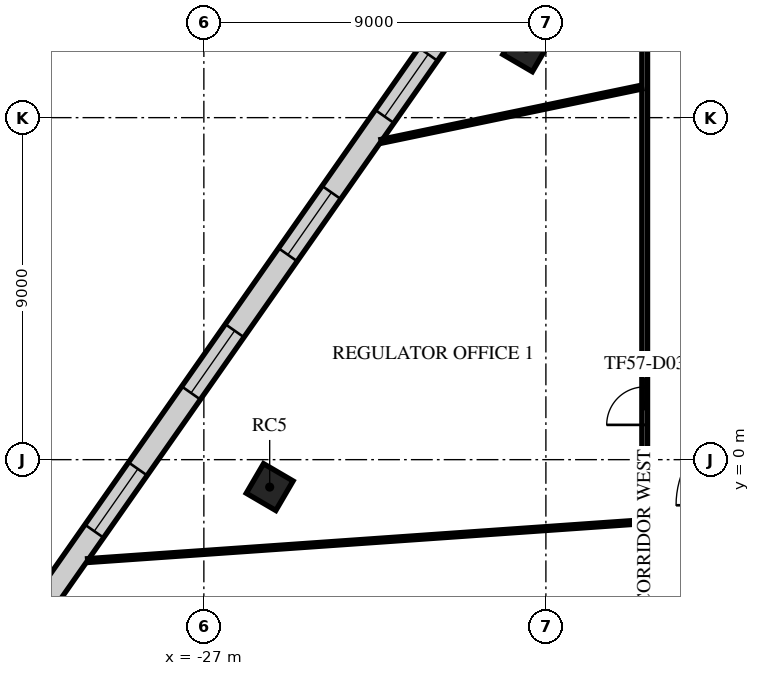
"""IFC4 building model, lengths in metres.
Left out: names, types, materials, properties, quantities, classifications, styles, units other than length and angle.
Written with IfcOpenShell. Run it as: python <this file> out.ifc"""

import sys

from ifc_helpers import new_model, si_unit, direction, frame, frame_2d, origin, origin_2d, place, context, subcontext, project, spatial, rectangle, extrude, element, fill, save


model = new_model("IFC4")
c1 = context("Model", 3, precision=1e-05, world=origin(), true_north=direction((0.0, 1.0)))
c2 = subcontext(c1, "Body", "Model", "MODEL_VIEW")
j1 = project(units=[si_unit("LENGTHUNIT", "METRE"), si_unit("PLANEANGLEUNIT", "RADIAN")], contexts=[c1])
p1 = place(None, origin())
s1 = spatial("IfcSite", under=j1, at=p1, CompositionType="ELEMENT")
p2 = place(p1, origin())
s2 = spatial("IfcBuilding", under=s1, at=p2, CompositionType="ELEMENT")
p3 = place(p2, frame((0.0, 0.0, 242.9)))
s3 = spatial("IfcBuildingStorey", under=s2, at=p3, CompositionType="ELEMENT", Elevation=242.9)
for number, where, z_axis, x_axis in (
    (1, (-18.518, 10.825, -0.36), (0.0, 0.0, 1.0), (0.505, 0.863, 0.0)),
    (2, (-25.268, -0.722, -0.36), (0.0, 0.0, 1.0), (0.505, 0.863, 0.0)),
):
    element("IfcColumn", number, at=place(p3, frame(where, z_axis=z_axis, x_axis=x_axis)), inside=s3, PredefinedType="COLUMN", context=c2, shape_type="SweptSolid", body=[
        extrude(rectangle(XDim=0.9, YDim=0.9, at=origin_2d()), origin(), (0.0, 0.0, 1.0), 4.36),
    ])
p4 = place(p3, frame((-5.115, 33.491, 0.0), z_axis=(0.0, 0.0, 1.0), x_axis=(-0.57357740375, -0.819151366908, 0.0)))
e3 = element("IfcWall", 3, at=p4, inside=s3, PredefinedType="STANDARD", context=c2, shape_type="SweptSolid", body=[
    extrude(rectangle(XDim=48.843, YDim=0.6, at=frame_2d((24.422, 0.0))), origin(), (0.0, 0.0, 1.0), 3.64),
])
p5 = place(p4, frame((1.22, 0.0, 0.9)))
e4 = element("IfcOpeningElement", 4, at=p5, cuts=e3, PredefinedType="OPENING", context=c2, shape_type="SweptSolid", body=[
    extrude(rectangle(XDim=2.0, YDim=2.1, at=frame_2d((1.0, 1.05))), frame((0.0, 0.31, 0.0), z_axis=(0.0, -1.0, 0.0), x_axis=(1.0, 0.0, 0.0)), (0.0, 0.0, 1.0), 0.62),
])
p6 = place(p4, frame((5.66, 0.0, 0.9)))
e5 = element("IfcOpeningElement", 5, at=p6, cuts=e3, PredefinedType="OPENING", context=c2, shape_type="SweptSolid", body=[
    extrude(rectangle(XDim=2.0, YDim=2.1, at=frame_2d((1.0, 1.05))), frame((0.0, 0.31, 0.0), z_axis=(0.0, -1.0, 0.0), x_axis=(1.0, 0.0, 0.0)), (0.0, 0.0, 1.0), 0.62),
])
p7 = place(p4, frame((10.101, 0.0, 0.9)))
e6 = element("IfcOpeningElement", 6, at=p7, cuts=e3, PredefinedType="OPENING", context=c2, shape_type="SweptSolid", body=[
    extrude(rectangle(XDim=2.0, YDim=2.1, at=frame_2d((1.0, 1.05))), frame((0.0, 0.31, 0.0), z_axis=(0.0, -1.0, 0.0), x_axis=(1.0, 0.0, 0.0)), (0.0, 0.0, 1.0), 0.62),
])
p8 = place(p4, frame((14.541, 0.0, 0.9)))
e7 = element("IfcOpeningElement", 7, at=p8, cuts=e3, PredefinedType="OPENING", context=c2, shape_type="SweptSolid", body=[
    extrude(rectangle(XDim=2.0, YDim=2.1, at=frame_2d((1.0, 1.05))), frame((0.0, 0.31, 0.0), z_axis=(0.0, -1.0, 0.0), x_axis=(1.0, 0.0, 0.0)), (0.0, 0.0, 1.0), 0.62),
])
p9 = place(p4, frame((18.981, 0.0, 0.9)))
e8 = element("IfcOpeningElement", 8, at=p9, cuts=e3, PredefinedType="OPENING", context=c2, shape_type="SweptSolid", body=[
    extrude(rectangle(XDim=2.0, YDim=2.1, at=frame_2d((1.0, 1.05))), frame((0.0, 0.31, 0.0), z_axis=(0.0, -1.0, 0.0), x_axis=(1.0, 0.0, 0.0)), (0.0, 0.0, 1.0), 0.62),
])
p10 = place(p4, frame((23.422, 0.0, 0.9)))
e9 = element("IfcOpeningElement", 9, at=p10, cuts=e3, PredefinedType="OPENING", context=c2, shape_type="SweptSolid", body=[
    extrude(rectangle(XDim=2.0, YDim=2.1, at=frame_2d((1.0, 1.05))), frame((0.0, 0.31, 0.0), z_axis=(0.0, -1.0, 0.0), x_axis=(1.0, 0.0, 0.0)), (0.0, 0.0, 1.0), 0.62),
])
p11 = place(p4, frame((27.862, 0.0, 0.9)))
e10 = element("IfcOpeningElement", 10, at=p11, cuts=e3, PredefinedType="OPENING", context=c2, shape_type="SweptSolid", body=[
    extrude(rectangle(XDim=2.0, YDim=2.1, at=frame_2d((1.0, 1.05))), frame((0.0, 0.31, 0.0), z_axis=(0.0, -1.0, 0.0), x_axis=(1.0, 0.0, 0.0)), (0.0, 0.0, 1.0), 0.62),
])
p12 = place(p4, frame((32.302, 0.0, 0.9)))
e11 = element("IfcOpeningElement", 11, at=p12, cuts=e3, PredefinedType="OPENING", context=c2, shape_type="SweptSolid", body=[
    extrude(rectangle(XDim=2.0, YDim=2.1, at=frame_2d((1.0, 1.05))), frame((0.0, 0.31, 0.0), z_axis=(0.0, -1.0, 0.0), x_axis=(1.0, 0.0, 0.0)), (0.0, 0.0, 1.0), 0.62),
])
p13 = place(p4, frame((36.742, 0.0, 0.9)))
e12 = element("IfcOpeningElement", 12, at=p13, cuts=e3, PredefinedType="OPENING", context=c2, shape_type="SweptSolid", body=[
    extrude(rectangle(XDim=2.0, YDim=2.1, at=frame_2d((1.0, 1.05))), frame((0.0, 0.31, 0.0), z_axis=(0.0, -1.0, 0.0), x_axis=(1.0, 0.0, 0.0)), (0.0, 0.0, 1.0), 0.62),
])
p14 = place(p4, frame((41.183, 0.0, 0.9)))
e13 = element("IfcOpeningElement", 13, at=p14, cuts=e3, PredefinedType="OPENING", context=c2, shape_type="SweptSolid", body=[
    extrude(rectangle(XDim=2.0, YDim=2.1, at=frame_2d((1.0, 1.05))), frame((0.0, 0.31, 0.0), z_axis=(0.0, -1.0, 0.0), x_axis=(1.0, 0.0, 0.0)), (0.0, 0.0, 1.0), 0.62),
])
p15 = place(p4, frame((45.623, 0.0, 0.9)))
e14 = element("IfcOpeningElement", 14, at=p15, cuts=e3, PredefinedType="OPENING", context=c2, shape_type="SweptSolid", body=[
    extrude(rectangle(XDim=2.0, YDim=2.1, at=frame_2d((1.0, 1.05))), frame((0.0, 0.31, 0.0), z_axis=(0.0, -1.0, 0.0), x_axis=(1.0, 0.0, 0.0)), (0.0, 0.0, 1.0), 0.62),
])
p16 = place(p3, frame((-15.4, -12.046, 0.0), z_axis=(0.0, 0.0, 1.0), x_axis=(0.0, 1.0, 0.0)))
e15 = element("IfcWall", 15, at=p16, inside=s3, PredefinedType="PARTITIONING", context=c2, shape_type="SweptSolid", body=[
    extrude(rectangle(XDim=27.446, YDim=0.15, at=frame_2d((13.723, 0.0))), origin(), (0.0, 0.0, 1.0), 3.24),
])
p17 = place(p16, frame((12.961, 0.0, 0.0)))
e16 = element("IfcOpeningElement", 16, at=p17, cuts=e15, PredefinedType="OPENING", context=c2, shape_type="SweptSolid", body=[
    extrude(rectangle(XDim=1.0, YDim=2.1, at=frame_2d((0.5, 1.05))), frame((0.0, 0.085, 0.0), z_axis=(0.0, -1.0, 0.0), x_axis=(1.0, 0.0, 0.0)), (0.0, 0.0, 1.0), 0.17),
])
p18 = place(p3, frame((-30.057, -2.656, 0.0), z_axis=(0.0, 0.0, 1.0), x_axis=(0.99756824466, 0.069696465096, 0.0)))
e17 = element("IfcWall", 17, at=p18, inside=s3, PredefinedType="PARTITIONING", context=c2, shape_type="SweptSolid", body=[
    extrude(rectangle(XDim=14.614, YDim=0.1, at=frame_2d((7.307, 0.0))), origin(), (0.0, 0.0, 1.0), 3.64),
])
p19 = place(p3, frame((-22.331, 8.378, 0.0), z_axis=(0.0, 0.0, 1.0), x_axis=(0.97903673151, 0.203683770474, 0.0)))
e18 = element("IfcWall", 18, at=p19, inside=s3, PredefinedType="PARTITIONING", context=c2, shape_type="SweptSolid", body=[
    extrude(rectangle(XDim=6.993, YDim=0.1, at=frame_2d((3.496, 0.0))), origin(), (0.0, 0.0, 1.0), 3.64),
])
p20 = place(p11, origin())
e19 = element("IfcWindow", 19, at=p20, inside=s3, PartitioningType="SINGLE_PANEL", PredefinedType="WINDOW", context=c2, shape_type="SweptSolid", body=[
    extrude(rectangle(XDim=2.0, YDim=2.1, at=frame_2d((1.0, 1.05))), frame((0.0, 0.03, 0.0), z_axis=(0.0, -1.0, 0.0), x_axis=(1.0, 0.0, 0.0)), (0.0, 0.0, 1.0), 0.06),
])
fill(e10, e19)
p21 = place(p12, origin())
e20 = element("IfcWindow", 20, at=p21, inside=s3, PartitioningType="SINGLE_PANEL", PredefinedType="WINDOW", context=c2, shape_type="SweptSolid", body=[
    extrude(rectangle(XDim=2.0, YDim=2.1, at=frame_2d((1.0, 1.05))), frame((0.0, 0.03, 0.0), z_axis=(0.0, -1.0, 0.0), x_axis=(1.0, 0.0, 0.0)), (0.0, 0.0, 1.0), 0.06),
])
fill(e11, e20)
p22 = place(p13, origin())
e21 = element("IfcWindow", 21, at=p22, inside=s3, PartitioningType="SINGLE_PANEL", PredefinedType="WINDOW", context=c2, shape_type="SweptSolid", body=[
    extrude(rectangle(XDim=2.0, YDim=2.1, at=frame_2d((1.0, 1.05))), frame((0.0, 0.03, 0.0), z_axis=(0.0, -1.0, 0.0), x_axis=(1.0, 0.0, 0.0)), (0.0, 0.0, 1.0), 0.06),
])
fill(e12, e21)
p23 = place(p14, origin())
e22 = element("IfcWindow", 22, at=p23, inside=s3, PartitioningType="SINGLE_PANEL", PredefinedType="WINDOW", context=c2, shape_type="SweptSolid", body=[
    extrude(rectangle(XDim=2.0, YDim=2.1, at=frame_2d((1.0, 1.05))), frame((0.0, 0.03, 0.0), z_axis=(0.0, -1.0, 0.0), x_axis=(1.0, 0.0, 0.0)), (0.0, 0.0, 1.0), 0.06),
])
fill(e13, e22)
p24 = place(p17, origin())
e23 = element("IfcDoor", 23, at=p24, inside=s3, OperationType="SINGLE_SWING_LEFT", PredefinedType="DOOR", context=c2, shape_type="SweptSolid", body=[
    extrude(rectangle(XDim=1.0, YDim=2.1, at=frame_2d((0.5, 1.05))), frame((0.0, 0.025, 0.0), z_axis=(0.0, -1.0, 0.0), x_axis=(1.0, 0.0, 0.0)), (0.0, 0.0, 1.0), 0.05),
])
fill(e16, e23)
save(model, sys.argv[1])
